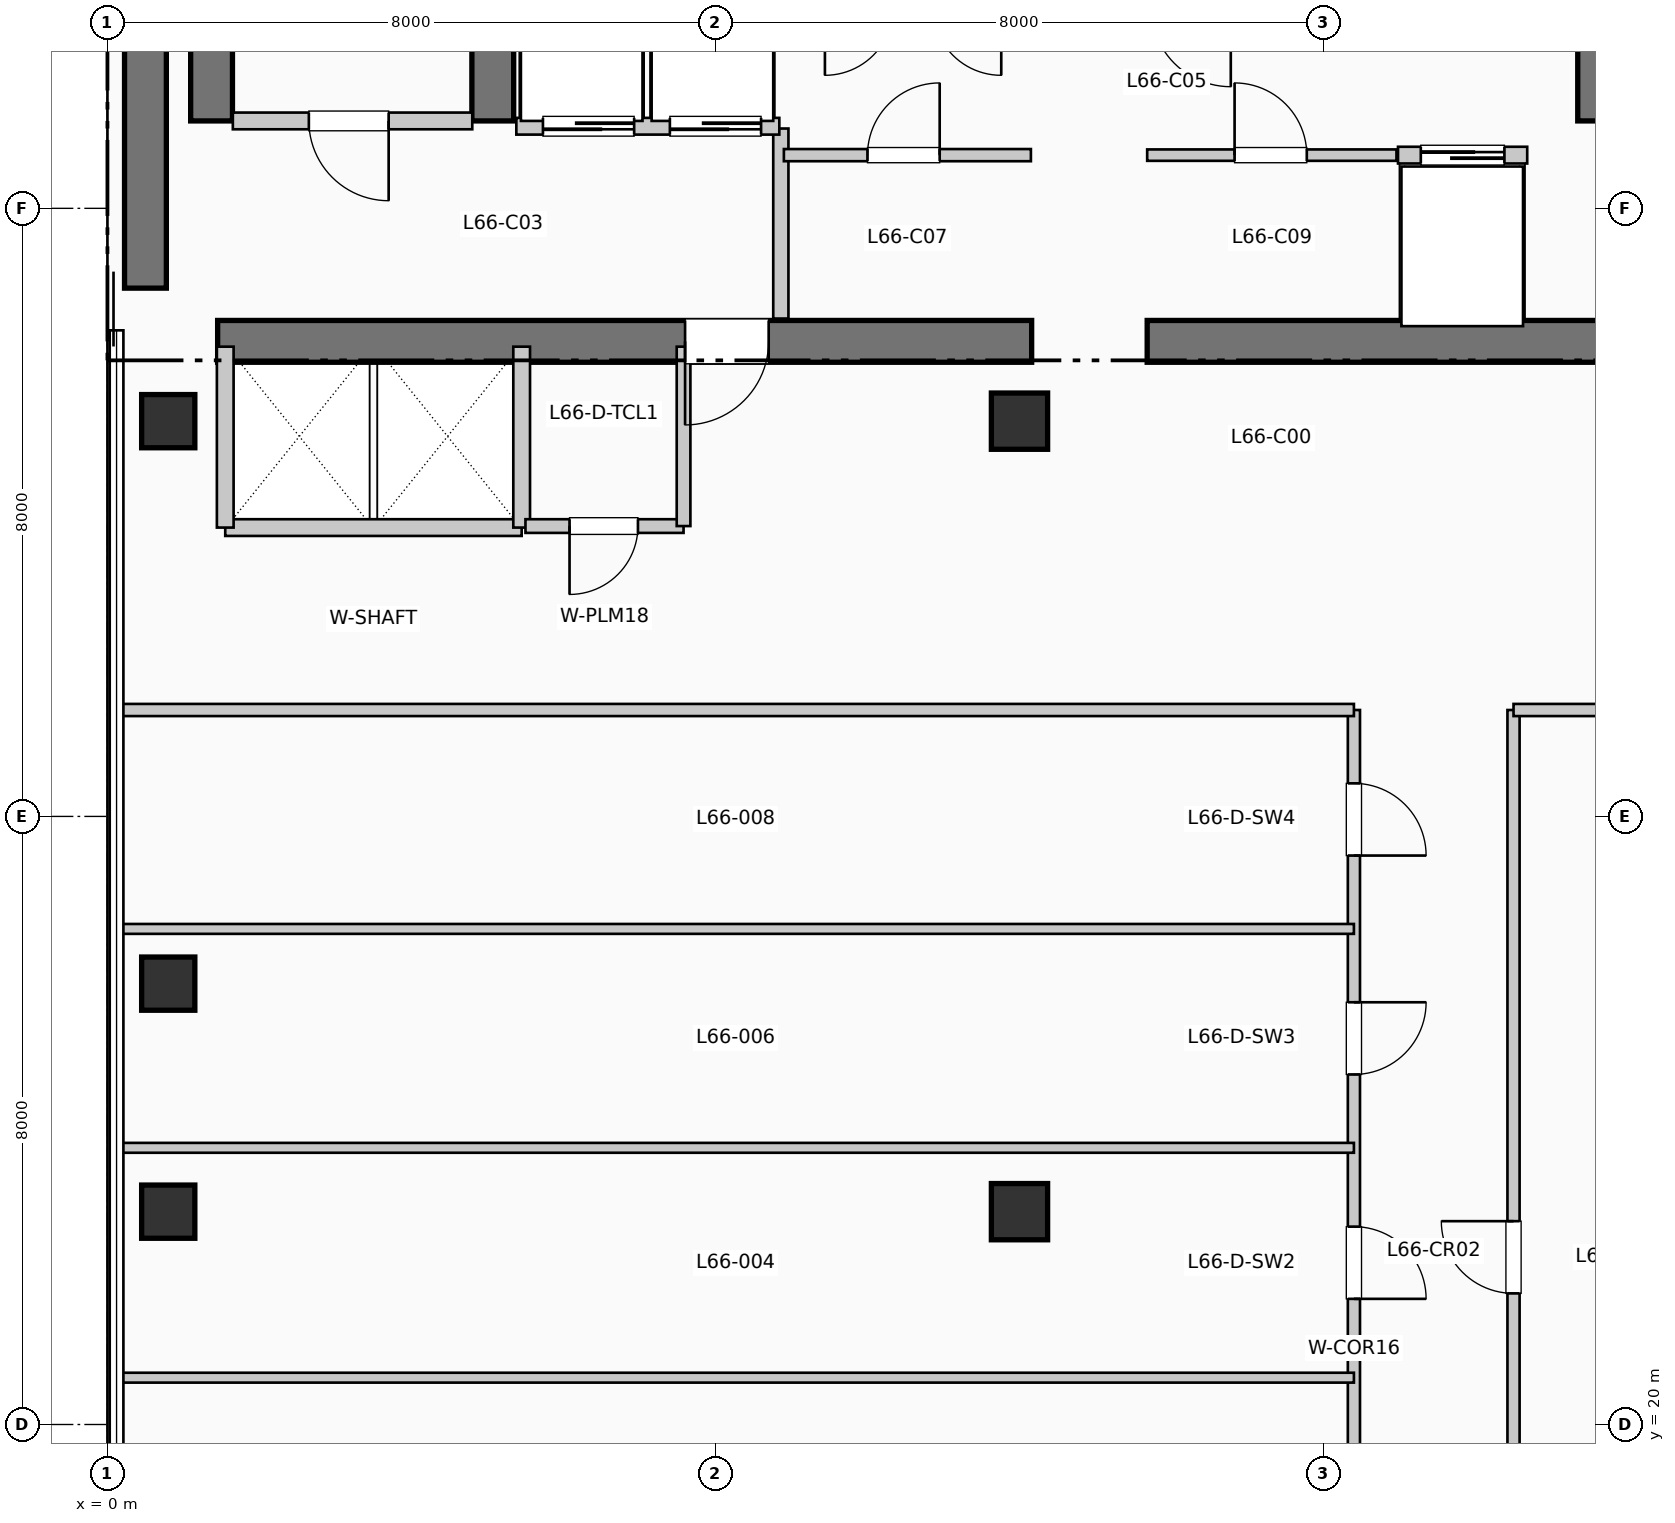
"""IFC4 building model, lengths in metres.
Left out: names, types, materials, properties, quantities, classifications, styles, units other than length and angle.
Written with IfcOpenShell. Run it as: python <this file> out.ifc"""

import sys

from ifc_helpers import new_model, si_unit, direction, frame, frame_2d, origin, origin_2d, place, context, subcontext, project, spatial, rectangle, extrude, element, fill, save


model = new_model("IFC4")
c1 = context("Model", 3, precision=1e-05, world=origin(), true_north=direction((0.0, 1.0)))
c2 = subcontext(c1, "Body", "Model", "MODEL_VIEW")
j1 = project(units=[si_unit("LENGTHUNIT", "METRE"), si_unit("PLANEANGLEUNIT", "RADIAN")], contexts=[c1])
p1 = place(None, origin())
s1 = spatial("IfcSite", under=j1, at=p1, CompositionType="ELEMENT")
p2 = place(p1, origin())
s2 = spatial("IfcBuilding", under=s1, at=p2, CompositionType="ELEMENT")
p3 = place(p2, frame((0.0, 0.0, 272.25)))
s3 = spatial("IfcBuildingStorey", under=s2, at=p3, CompositionType="ELEMENT", Elevation=272.25)
p4 = place(p3, frame((0.5, 34.95, 0.0), z_axis=(0.0, 0.0, 1.0), x_axis=(0.0, 1.0, 0.0)))
e1 = element("IfcWall", 1, at=p4, inside=s3, PredefinedType="SHEAR", context=c2, shape_type="SweptSolid", body=[
    extrude(rectangle(XDim=7.9, YDim=0.55, at=frame_2d((3.95, 0.0))), origin(), (0.0, 0.0, 1.0), 3.96),
])
p5 = place(p3, frame((1.45, 34.25, 0.0), z_axis=(0.0, 0.0, 1.0), x_axis=(1.0, 0.0, 0.0)))
e2 = element("IfcWall", 2, at=p5, inside=s3, PredefinedType="SHEAR", context=c2, shape_type="SweptSolid", body=[
    extrude(rectangle(XDim=10.71, YDim=0.55, at=frame_2d((5.355, 0.0))), origin(), (0.0, 0.0, 1.0), 3.96),
])
p6 = place(p5, frame((7.25, 0.0, 0.0), z_axis=(0.0, 0.0, 1.0), x_axis=(-1.0, 0.0, 0.0)))
e3 = element("IfcOpeningElement", 3, at=p6, cuts=e2, PredefinedType="OPENING", context=c2, shape_type="SweptSolid", body=[
    extrude(rectangle(XDim=1.1, YDim=2.15, at=frame_2d((0.55, 1.075))), frame((0.0, 0.285, 0.0), z_axis=(0.0, -1.0, 0.0), x_axis=(1.0, 0.0, 0.0)), (0.0, 0.0, 1.0), 0.57),
])
p7 = place(p3, frame((13.68, 34.25, 0.0), z_axis=(0.0, 0.0, 1.0), x_axis=(1.0, 0.0, 0.0)))
e4 = element("IfcWall", 4, at=p7, inside=s3, PredefinedType="SHEAR", context=c2, shape_type="SweptSolid", body=[
    extrude(rectangle(XDim=6.12, YDim=0.55, at=frame_2d((3.06, 0.0))), origin(), (0.0, 0.0, 1.0), 3.96),
])
for number, where, z_axis, x_axis in (
    (5, (1.37, 37.15, 0.0), (0.0, 0.0, 1.0), (0.0, 1.0, 0.0)),
    (6, (5.07, 37.15, 0.0), (0.0, 0.0, 1.0), (0.0, 1.0, 0.0)),
    (7, (19.62, 37.15, 0.0), (0.0, 0.0, 1.0), (0.0, 1.0, 0.0)),
):
    element("IfcWall", number, at=place(p3, frame(where, z_axis=z_axis, x_axis=x_axis)), inside=s3, PredefinedType="SHEAR", context=c2, shape_type="SweptSolid", body=[
        extrude(rectangle(XDim=7.89, YDim=0.55, at=frame_2d((3.945, 0.0))), origin(), (0.0, 0.0, 1.0), 3.96),
    ])
for number, where, z_axis, x_axis in (
    (8, (0.8, 22.8, 0.0), (0.0, 0.0, 1.0), (1.0, 0.0, 0.0)),
    (9, (0.8, 25.8, 0.0), (0.0, 0.0, 1.0), (1.0, 0.0, 0.0)),
    (10, (0.8, 33.2, 0.0), (0.0, 0.0, 1.0), (1.0, 0.0, 0.0)),
):
    element("IfcColumn", number, at=place(p3, frame(where, z_axis=z_axis, x_axis=x_axis)), inside=s3, PredefinedType="COLUMN", context=c2, shape_type="SweptSolid", body=[
        extrude(rectangle(XDim=0.7, YDim=0.7, at=origin_2d()), origin(), (0.0, 0.0, 1.0), 3.96),
    ])
for number, where, z_axis, x_axis in (
    (11, (12.0, 22.8, 0.0), (0.0, 0.0, 1.0), (1.0, 0.0, 0.0)),
    (12, (12.0, 33.2, 0.0), (0.0, 0.0, 1.0), (1.0, 0.0, 0.0)),
):
    element("IfcColumn", number, at=place(p3, frame(where, z_axis=z_axis, x_axis=x_axis)), inside=s3, PredefinedType="COLUMN", context=c2, shape_type="SweptSolid", body=[
        extrude(rectangle(XDim=0.74, YDim=0.74, at=origin_2d()), origin(), (0.0, 0.0, 1.0), 3.96),
    ])
p8 = place(p3, frame((1.65, 37.15, 0.0), z_axis=(0.0, 0.0, 1.0), x_axis=(1.0, 0.0, 0.0)))
e13 = element("IfcWall", 13, at=p8, inside=s3, PredefinedType="PARTITIONING", context=c2, shape_type="SweptSolid", body=[
    extrude(rectangle(XDim=3.15, YDim=0.22, at=frame_2d((1.575, 0.0))), origin(), (0.0, 0.0, 1.0), 3.74),
])
p9 = place(p8, frame((2.05, 0.0, 0.0), z_axis=(0.0, 0.0, 1.0), x_axis=(-1.0, 0.0, 0.0)))
e14 = element("IfcOpeningElement", 14, at=p9, cuts=e13, PredefinedType="OPENING", context=c2, shape_type="SweptSolid", body=[
    extrude(rectangle(XDim=1.05, YDim=2.15, at=frame_2d((0.525, 1.075))), frame((0.0, 0.12, 0.0), z_axis=(0.0, -1.0, 0.0), x_axis=(1.0, 0.0, 0.0)), (0.0, 0.0, 1.0), 0.24),
])
p10 = place(p3, frame((8.86, 34.55, 0.0), z_axis=(0.0, 0.0, 1.0), x_axis=(0.0, 1.0, 0.0)))
e15 = element("IfcWall", 15, at=p10, inside=s3, PredefinedType="PARTITIONING", context=c2, shape_type="SweptSolid", body=[
    extrude(rectangle(XDim=2.5, YDim=0.2, at=frame_2d((1.25, 0.0))), origin(), (0.0, 0.0, 1.0), 3.74),
])
p11 = place(p3, frame((5.38, 37.08, 0.0), z_axis=(0.0, 0.0, 1.0), x_axis=(1.0, 0.0, 0.0)))
e16 = element("IfcWall", 16, at=p11, inside=s3, PredefinedType="PARTITIONING", context=c2, shape_type="SweptSolid", body=[
    extrude(rectangle(XDim=3.46, YDim=0.22, at=frame_2d((1.73, 0.0))), origin(), (0.0, 0.0, 1.0), 3.74),
])
p12 = place(p11, frame((1.55, 0.0, 0.0), z_axis=(0.0, 0.0, 1.0), x_axis=(-1.0, 0.0, 0.0)))
e17 = element("IfcOpeningElement", 17, at=p12, cuts=e16, PredefinedType="OPENING", context=c2, shape_type="SweptSolid", body=[
    extrude(rectangle(XDim=1.2, YDim=2.2, at=frame_2d((0.6, 1.1))), frame((0.0, 0.12, 0.0), z_axis=(0.0, -1.0, 0.0), x_axis=(1.0, 0.0, 0.0)), (0.0, 0.0, 1.0), 0.24),
])
p13 = place(p11, frame((3.22, 0.0, 0.0), z_axis=(0.0, 0.0, 1.0), x_axis=(-1.0, 0.0, 0.0)))
e18 = element("IfcOpeningElement", 18, at=p13, cuts=e16, PredefinedType="OPENING", context=c2, shape_type="SweptSolid", body=[
    extrude(rectangle(XDim=1.2, YDim=2.2, at=frame_2d((0.6, 1.1))), frame((0.0, 0.12, 0.0), z_axis=(0.0, -1.0, 0.0), x_axis=(1.0, 0.0, 0.0)), (0.0, 0.0, 1.0), 0.24),
])
p14 = place(p3, frame((1.55, 31.8, 0.0), z_axis=(0.0, 0.0, 1.0), x_axis=(1.0, 0.0, 0.0)))
e19 = element("IfcWall", 19, at=p14, inside=s3, PredefinedType="PARTITIONING", context=c2, shape_type="SweptSolid", body=[
    extrude(rectangle(XDim=3.9, YDim=0.22, at=frame_2d((1.95, 0.0))), origin(), (0.0, 0.0, 1.0), 3.74),
])
for number, where, z_axis, x_axis in (
    (20, (1.55, 31.8, 0.0), (0.0, 0.0, 1.0), (0.0, 1.0, 0.0)),
    (21, (5.45, 31.8, 0.0), (0.0, 0.0, 1.0), (0.0, 1.0, 0.0)),
):
    element("IfcWall", number, at=place(p3, frame(where, z_axis=z_axis, x_axis=x_axis)), inside=s3, PredefinedType="PARTITIONING", context=c2, shape_type="SweptSolid", body=[
        extrude(rectangle(XDim=2.38, YDim=0.22, at=frame_2d((1.19, 0.0))), origin(), (0.0, 0.0, 1.0), 3.74),
    ])
p15 = place(p3, frame((5.5, 31.82, 0.0), z_axis=(0.0, 0.0, 1.0), x_axis=(1.0, 0.0, 0.0)))
e22 = element("IfcWall", 22, at=p15, inside=s3, PredefinedType="PLUMBINGWALL", context=c2, shape_type="SweptSolid", body=[
    extrude(rectangle(XDim=2.08, YDim=0.18, at=frame_2d((1.04, 0.0))), origin(), (0.0, 0.0, 1.0), 3.74),
])
p16 = place(p15, frame((1.48, 0.0, 0.0), z_axis=(0.0, 0.0, 1.0), x_axis=(-1.0, 0.0, 0.0)))
e23 = element("IfcOpeningElement", 23, at=p16, cuts=e22, PredefinedType="OPENING", context=c2, shape_type="SweptSolid", body=[
    extrude(rectangle(XDim=0.9, YDim=2.1, at=frame_2d((0.45, 1.05))), frame((0.0, 0.1, 0.0), z_axis=(0.0, -1.0, 0.0), x_axis=(1.0, 0.0, 0.0)), (0.0, 0.0, 1.0), 0.2),
])
p17 = place(p3, frame((7.58, 31.82, 0.0), z_axis=(0.0, 0.0, 1.0), x_axis=(0.0, 1.0, 0.0)))
e24 = element("IfcWall", 24, at=p17, inside=s3, PredefinedType="PLUMBINGWALL", context=c2, shape_type="SweptSolid", body=[
    extrude(rectangle(XDim=2.36, YDim=0.18, at=frame_2d((1.18, 0.0))), origin(), (0.0, 0.0, 1.0), 3.74),
])
p18 = place(p3, frame((8.9, 36.7, 0.0), z_axis=(0.0, 0.0, 1.0), x_axis=(1.0, 0.0, 0.0)))
e25 = element("IfcWall", 25, at=p18, inside=s3, PredefinedType="PARTITIONING", context=c2, shape_type="SweptSolid", body=[
    extrude(rectangle(XDim=3.25, YDim=0.16, at=frame_2d((1.625, 0.0))), origin(), (0.0, 0.0, 1.0), 3.74),
])
p19 = place(p18, frame((1.1, 0.0, 0.0)))
e26 = element("IfcOpeningElement", 26, at=p19, cuts=e25, PredefinedType="OPENING", context=c2, shape_type="SweptSolid", body=[
    extrude(rectangle(XDim=0.95, YDim=2.15, at=frame_2d((0.475, 1.075))), frame((0.0, 0.09, 0.0), z_axis=(0.0, -1.0, 0.0), x_axis=(1.0, 0.0, 0.0)), (0.0, 0.0, 1.0), 0.18),
])
p20 = place(p3, frame((13.68, 36.7, 0.0), z_axis=(0.0, 0.0, 1.0), x_axis=(1.0, 0.0, 0.0)))
e27 = element("IfcWall", 27, at=p20, inside=s3, PredefinedType="PARTITIONING", context=c2, shape_type="SweptSolid", body=[
    extrude(rectangle(XDim=3.28, YDim=0.15, at=frame_2d((1.64, 0.0))), origin(), (0.0, 0.0, 1.0), 3.74),
])
p21 = place(p20, frame((1.15, 0.0, 0.0)))
e28 = element("IfcOpeningElement", 28, at=p21, cuts=e27, PredefinedType="OPENING", context=c2, shape_type="SweptSolid", body=[
    extrude(rectangle(XDim=0.95, YDim=2.15, at=frame_2d((0.475, 1.075))), frame((0.0, 0.085, 0.0), z_axis=(0.0, -1.0, 0.0), x_axis=(1.0, 0.0, 0.0)), (0.0, 0.0, 1.0), 0.17),
])
p22 = place(p3, frame((16.98, 36.7, 0.0), z_axis=(0.0, 0.0, 1.0), x_axis=(1.0, 0.0, 0.0)))
e29 = element("IfcWall", 29, at=p22, inside=s3, PredefinedType="PARTITIONING", context=c2, shape_type="SweptSolid", body=[
    extrude(rectangle(XDim=1.7, YDim=0.22, at=frame_2d((0.85, 0.0))), origin(), (0.0, 0.0, 1.0), 3.74),
])
p23 = place(p22, frame((0.3, 0.0, 0.0)))
e30 = element("IfcOpeningElement", 30, at=p23, cuts=e29, PredefinedType="OPENING", context=c2, shape_type="SweptSolid", body=[
    extrude(rectangle(XDim=1.1, YDim=2.2, at=frame_2d((0.55, 1.1))), frame((0.0, 0.12, 0.0), z_axis=(0.0, -1.0, 0.0), x_axis=(1.0, 0.0, 0.0)), (0.0, 0.0, 1.0), 0.24),
])
p24 = place(p3, frame((16.4, 15.0, 0.0), z_axis=(0.0, 0.0, 1.0), x_axis=(0.0, 1.0, 0.0)))
e31 = element("IfcWall", 31, at=p24, inside=s3, PredefinedType="PARTITIONING", context=c2, shape_type="SweptSolid", body=[
    extrude(rectangle(XDim=14.4, YDim=0.16, at=frame_2d((7.2, 0.0))), origin(), (0.0, 0.0, 1.0), 3.74),
])
p25 = place(p24, frame((3.283, 0.0, 0.0), z_axis=(0.0, 0.0, 1.0), x_axis=(-1.0, 0.0, 0.0)))
e32 = element("IfcOpeningElement", 32, at=p25, cuts=e31, PredefinedType="OPENING", context=c2, shape_type="SweptSolid", body=[
    extrude(rectangle(XDim=0.95, YDim=2.15, at=frame_2d((0.475, 1.075))), frame((0.0, 0.09, 0.0), z_axis=(0.0, -1.0, 0.0), x_axis=(1.0, 0.0, 0.0)), (0.0, 0.0, 1.0), 0.18),
])
p26 = place(p24, frame((7.603, 0.0, 0.0), z_axis=(0.0, 0.0, 1.0), x_axis=(-1.0, 0.0, 0.0)))
e33 = element("IfcOpeningElement", 33, at=p26, cuts=e31, PredefinedType="OPENING", context=c2, shape_type="SweptSolid", body=[
    extrude(rectangle(XDim=0.95, YDim=2.15, at=frame_2d((0.475, 1.075))), frame((0.0, 0.09, 0.0), z_axis=(0.0, -1.0, 0.0), x_axis=(1.0, 0.0, 0.0)), (0.0, 0.0, 1.0), 0.18),
])
p27 = place(p24, frame((10.555, 0.0, 0.0), z_axis=(0.0, 0.0, 1.0), x_axis=(-1.0, 0.0, 0.0)))
e34 = element("IfcOpeningElement", 34, at=p27, cuts=e31, PredefinedType="OPENING", context=c2, shape_type="SweptSolid", body=[
    extrude(rectangle(XDim=0.95, YDim=2.15, at=frame_2d((0.475, 1.075))), frame((0.0, 0.09, 0.0), z_axis=(0.0, -1.0, 0.0), x_axis=(1.0, 0.0, 0.0)), (0.0, 0.0, 1.0), 0.18),
])
p28 = place(p24, frame((13.435, 0.0, 0.0), z_axis=(0.0, 0.0, 1.0), x_axis=(-1.0, 0.0, 0.0)))
e35 = element("IfcOpeningElement", 35, at=p28, cuts=e31, PredefinedType="OPENING", context=c2, shape_type="SweptSolid", body=[
    extrude(rectangle(XDim=0.95, YDim=2.15, at=frame_2d((0.475, 1.075))), frame((0.0, 0.09, 0.0), z_axis=(0.0, -1.0, 0.0), x_axis=(1.0, 0.0, 0.0)), (0.0, 0.0, 1.0), 0.18),
])
p29 = place(p3, frame((18.5, 15.0, 0.0), z_axis=(0.0, 0.0, 1.0), x_axis=(0.0, 1.0, 0.0)))
e36 = element("IfcWall", 36, at=p29, inside=s3, PredefinedType="PARTITIONING", context=c2, shape_type="SweptSolid", body=[
    extrude(rectangle(XDim=14.4, YDim=0.16, at=frame_2d((7.2, 0.0))), origin(), (0.0, 0.0, 1.0), 3.74),
])
p30 = place(p29, frame((6.725, 0.0, 0.0)))
e37 = element("IfcOpeningElement", 37, at=p30, cuts=e36, PredefinedType="OPENING", context=c2, shape_type="SweptSolid", body=[
    extrude(rectangle(XDim=0.95, YDim=2.15, at=frame_2d((0.475, 1.075))), frame((0.0, 0.09, 0.0), z_axis=(0.0, -1.0, 0.0), x_axis=(1.0, 0.0, 0.0)), (0.0, 0.0, 1.0), 0.18),
])
p31 = place(p3, frame((0.19, 29.4, 0.0), z_axis=(0.0, 0.0, 1.0), x_axis=(1.0, 0.0, 0.0)))
e38 = element("IfcWall", 38, at=p31, inside=s3, PredefinedType="PARTITIONING", context=c2, shape_type="SweptSolid", body=[
    extrude(rectangle(XDim=16.21, YDim=0.16, at=frame_2d((8.105, 0.0))), origin(), (0.0, 0.0, 1.0), 3.425),
])
p32 = place(p3, frame((18.5, 29.4, 0.0), z_axis=(0.0, 0.0, 1.0), x_axis=(1.0, 0.0, 0.0)))
e39 = element("IfcWall", 39, at=p32, inside=s3, PredefinedType="PARTITIONING", context=c2, shape_type="SweptSolid", body=[
    extrude(rectangle(XDim=4.95, YDim=0.16, at=frame_2d((2.475, 0.0))), origin(), (0.0, 0.0, 1.0), 3.425),
])
for number, where, z_axis, x_axis in (
    (40, (0.19, 20.616, 0.0), (0.0, 0.0, 1.0), (1.0, 0.0, 0.0)),
    (41, (0.19, 23.64, 0.0), (0.0, 0.0, 1.0), (1.0, 0.0, 0.0)),
    (42, (0.19, 26.52, 0.0), (0.0, 0.0, 1.0), (1.0, 0.0, 0.0)),
):
    element("IfcWall", number, at=place(p3, frame(where, z_axis=z_axis, x_axis=x_axis)), inside=s3, PredefinedType="PARTITIONING", context=c2, shape_type="SweptSolid", body=[
        extrude(rectangle(XDim=16.21, YDim=0.13, at=frame_2d((8.105, 0.0))), origin(), (0.0, 0.0, 1.0), 3.74),
    ])
p33 = place(p9, origin())
e43 = element("IfcDoor", 43, at=p33, inside=s3, OperationType="SINGLE_SWING_RIGHT", PredefinedType="DOOR", context=c2, shape_type="SweptSolid", body=[
    extrude(rectangle(XDim=1.05, YDim=2.15, at=frame_2d((0.525, 1.075))), frame((0.0, 0.025, 0.0), z_axis=(0.0, -1.0, 0.0), x_axis=(1.0, 0.0, 0.0)), (0.0, 0.0, 1.0), 0.05),
])
fill(e14, e43)
p34 = place(p6, origin())
e44 = element("IfcDoor", 44, at=p34, inside=s3, OperationType="SINGLE_SWING_LEFT", PredefinedType="DOOR", context=c2, shape_type="SweptSolid", body=[
    extrude(rectangle(XDim=1.1, YDim=2.15, at=frame_2d((0.55, 1.075))), frame((0.0, 0.025, 0.0), z_axis=(0.0, -1.0, 0.0), x_axis=(1.0, 0.0, 0.0)), (0.0, 0.0, 1.0), 0.05),
])
fill(e3, e44)
p35 = place(p12, origin())
e45 = element("IfcDoor", 45, at=p35, inside=s3, OperationType="SLIDING_TO_RIGHT", PredefinedType="DOOR", context=c2, shape_type="SweptSolid", body=[
    extrude(rectangle(XDim=1.2, YDim=2.2, at=frame_2d((0.6, 1.1))), frame((0.0, 0.025, 0.0), z_axis=(0.0, -1.0, 0.0), x_axis=(1.0, 0.0, 0.0)), (0.0, 0.0, 1.0), 0.05),
])
fill(e17, e45)
p36 = place(p13, origin())
e46 = element("IfcDoor", 46, at=p36, inside=s3, OperationType="SLIDING_TO_RIGHT", PredefinedType="DOOR", context=c2, shape_type="SweptSolid", body=[
    extrude(rectangle(XDim=1.2, YDim=2.2, at=frame_2d((0.6, 1.1))), frame((0.0, 0.025, 0.0), z_axis=(0.0, -1.0, 0.0), x_axis=(1.0, 0.0, 0.0)), (0.0, 0.0, 1.0), 0.05),
])
fill(e18, e46)
p37 = place(p16, origin())
e47 = element("IfcDoor", 47, at=p37, inside=s3, OperationType="SINGLE_SWING_LEFT", PredefinedType="DOOR", context=c2, shape_type="SweptSolid", body=[
    extrude(rectangle(XDim=0.9, YDim=2.1, at=frame_2d((0.45, 1.05))), frame((0.0, 0.025, 0.0), z_axis=(0.0, -1.0, 0.0), x_axis=(1.0, 0.0, 0.0)), (0.0, 0.0, 1.0), 0.05),
])
fill(e23, e47)
p38 = place(p19, origin())
e48 = element("IfcDoor", 48, at=p38, inside=s3, OperationType="SINGLE_SWING_RIGHT", PredefinedType="DOOR", context=c2, shape_type="SweptSolid", body=[
    extrude(rectangle(XDim=0.95, YDim=2.15, at=frame_2d((0.475, 1.075))), frame((0.0, 0.025, 0.0), z_axis=(0.0, -1.0, 0.0), x_axis=(1.0, 0.0, 0.0)), (0.0, 0.0, 1.0), 0.05),
])
fill(e26, e48)
p39 = place(p21, origin())
e49 = element("IfcDoor", 49, at=p39, inside=s3, OperationType="SINGLE_SWING_LEFT", PredefinedType="DOOR", context=c2, shape_type="SweptSolid", body=[
    extrude(rectangle(XDim=0.95, YDim=2.15, at=frame_2d((0.475, 1.075))), frame((0.0, 0.025, 0.0), z_axis=(0.0, -1.0, 0.0), x_axis=(1.0, 0.0, 0.0)), (0.0, 0.0, 1.0), 0.05),
])
fill(e28, e49)
p40 = place(p23, origin())
e50 = element("IfcDoor", 50, at=p40, inside=s3, OperationType="SLIDING_TO_LEFT", PredefinedType="DOOR", context=c2, shape_type="SweptSolid", body=[
    extrude(rectangle(XDim=1.1, YDim=2.2, at=frame_2d((0.55, 1.1))), frame((0.0, 0.025, 0.0), z_axis=(0.0, -1.0, 0.0), x_axis=(1.0, 0.0, 0.0)), (0.0, 0.0, 1.0), 0.05),
])
fill(e30, e50)
p41 = place(p26, origin())
e51 = element("IfcDoor", 51, at=p41, inside=s3, OperationType="SINGLE_SWING_LEFT", PredefinedType="DOOR", context=c2, shape_type="SweptSolid", body=[
    extrude(rectangle(XDim=0.95, YDim=2.15, at=frame_2d((0.475, 1.075))), frame((0.0, 0.025, 0.0), z_axis=(0.0, -1.0, 0.0), x_axis=(1.0, 0.0, 0.0)), (0.0, 0.0, 1.0), 0.05),
])
fill(e33, e51)
p42 = place(p27, origin())
e52 = element("IfcDoor", 52, at=p42, inside=s3, OperationType="SINGLE_SWING_RIGHT", PredefinedType="DOOR", context=c2, shape_type="SweptSolid", body=[
    extrude(rectangle(XDim=0.95, YDim=2.15, at=frame_2d((0.475, 1.075))), frame((0.0, 0.025, 0.0), z_axis=(0.0, -1.0, 0.0), x_axis=(1.0, 0.0, 0.0)), (0.0, 0.0, 1.0), 0.05),
])
fill(e34, e52)
p43 = place(p28, origin())
e53 = element("IfcDoor", 53, at=p43, inside=s3, OperationType="SINGLE_SWING_LEFT", PredefinedType="DOOR", context=c2, shape_type="SweptSolid", body=[
    extrude(rectangle(XDim=0.95, YDim=2.15, at=frame_2d((0.475, 1.075))), frame((0.0, 0.025, 0.0), z_axis=(0.0, -1.0, 0.0), x_axis=(1.0, 0.0, 0.0)), (0.0, 0.0, 1.0), 0.05),
])
fill(e35, e53)
p44 = place(p30, origin())
e54 = element("IfcDoor", 54, at=p44, inside=s3, OperationType="SINGLE_SWING_RIGHT", PredefinedType="DOOR", context=c2, shape_type="SweptSolid", body=[
    extrude(rectangle(XDim=0.95, YDim=2.15, at=frame_2d((0.475, 1.075))), frame((0.0, 0.025, 0.0), z_axis=(0.0, -1.0, 0.0), x_axis=(1.0, 0.0, 0.0)), (0.0, 0.0, 1.0), 0.05),
])
fill(e37, e54)
save(model, sys.argv[1])
